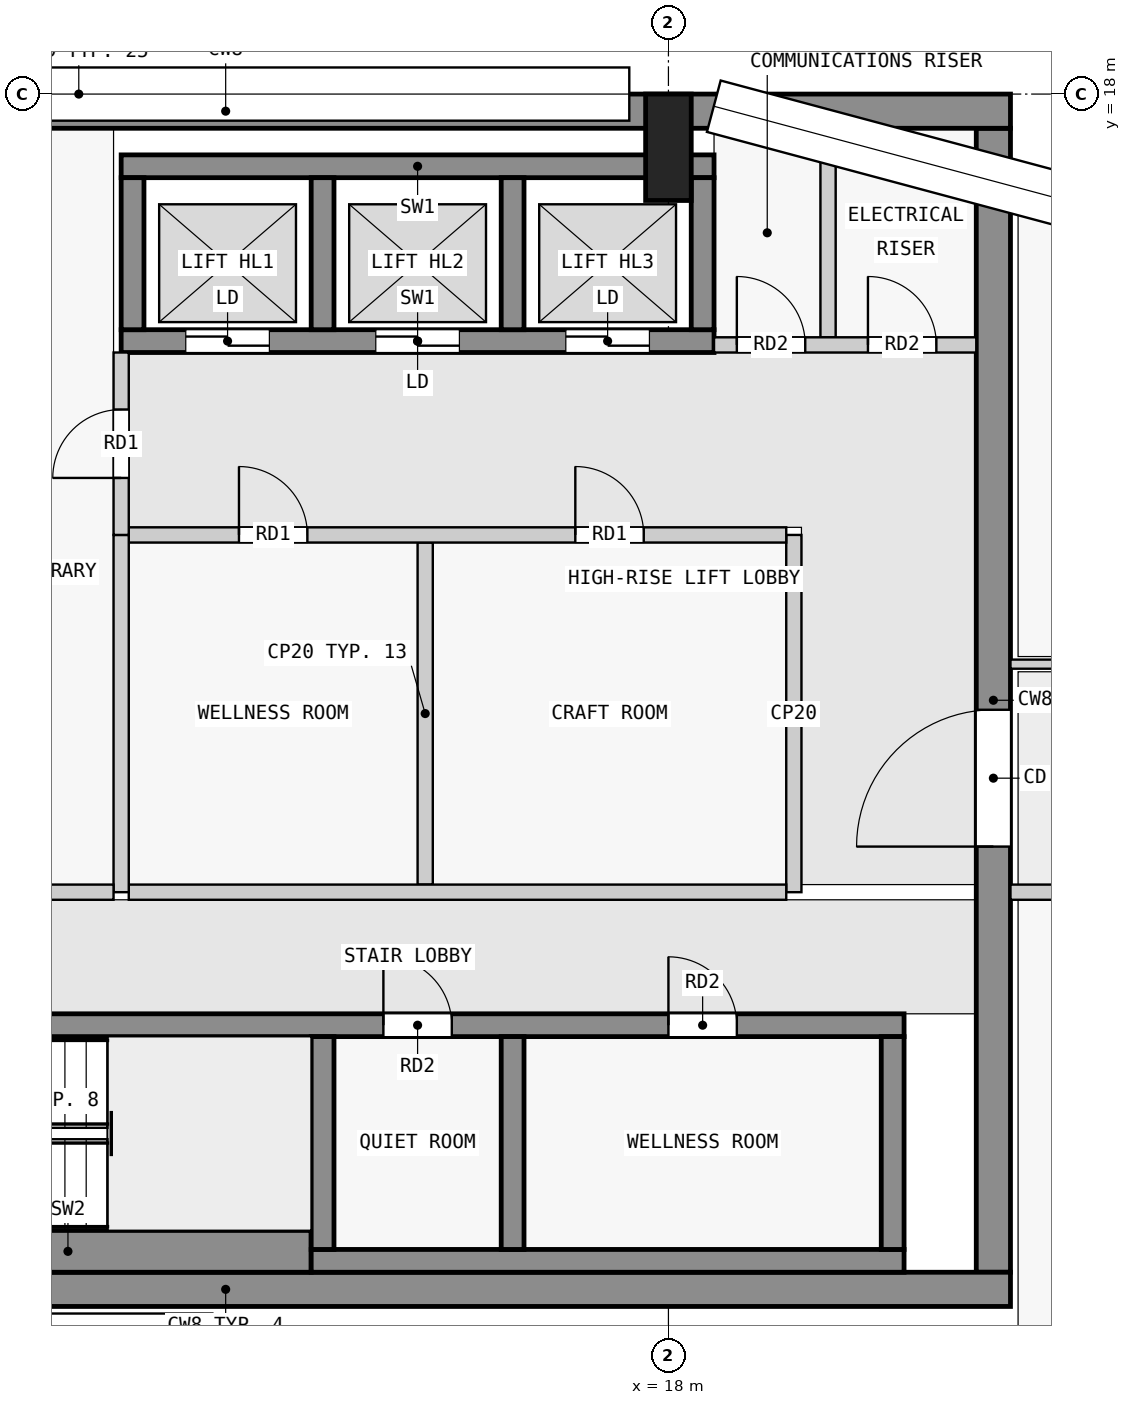
"""IFC4 building model, lengths in metres.
Left out: names, types, materials, properties, quantities, classifications, styles, units other than length and angle.
Written with IfcOpenShell. Run it as: python <this file> out.ifc"""

import sys

from ifc_helpers import new_model, si_unit, direction, frame, frame_2d, origin, origin_2d, place, context, subcontext, project, spatial, rectangle, extrude, element, fill, save


model = new_model("IFC4")
c1 = context("Model", 3, precision=1e-05, world=origin(), true_north=direction((0.0, 1.0)))
c2 = subcontext(c1, "Body", "Model", "MODEL_VIEW")
j1 = project(units=[si_unit("LENGTHUNIT", "METRE"), si_unit("PLANEANGLEUNIT", "RADIAN")], contexts=[c1])
p1 = place(None, origin())
s1 = spatial("IfcSite", under=j1, at=p1, CompositionType="ELEMENT")
p2 = place(p1, origin())
s2 = spatial("IfcBuilding", under=s1, at=p2, CompositionType="ELEMENT")
p3 = place(p2, frame((0.0, 0.0, 291.4)))
s3 = spatial("IfcBuildingStorey", under=s2, at=p3, CompositionType="ELEMENT", Elevation=291.4)
p4 = place(p3, frame((18.0, 17.3, 0.0), z_axis=(0.0, 0.0, 1.0), x_axis=(1.0, 0.0, 0.0)))
e1 = element("IfcColumn", 1, at=p4, inside=s3, PredefinedType="COLUMN", context=c2, shape_type="SweptSolid", body=[
    extrude(rectangle(XDim=0.6, YDim=1.4, at=origin_2d()), origin(), (0.0, 0.0, 1.0), 3.5),
])
for number, where, z_axis, x_axis in (
    (2, (1.85, 2.275, 0.0), (0.0, 0.0, 1.0), (1.0, 0.0, 0.0)),
    (3, (1.85, 17.775, 0.0), (0.0, 0.0, 1.0), (1.0, 0.0, 0.0)),
):
    element("IfcWall", number, at=place(p3, frame(where, z_axis=z_axis, x_axis=x_axis)), inside=s3, PredefinedType="SHEAR", context=c2, shape_type="SweptSolid", body=[
        extrude(rectangle(XDim=20.65, YDim=0.45, at=frame_2d((10.325, 0.0))), origin(), (0.0, 0.0, 1.0), 3.05),
    ])
p5 = place(p3, frame((22.275, 2.5, 0.0), z_axis=(0.0, 0.0, 1.0), x_axis=(0.0, 1.0, 0.0)))
e4 = element("IfcWall", 4, at=p5, inside=s3, PredefinedType="SHEAR", context=c2, shape_type="SweptSolid", body=[
    extrude(rectangle(XDim=15.05, YDim=0.45, at=frame_2d((7.525, 0.0))), origin(), (0.0, 0.0, 1.0), 3.05),
])
p6 = place(p5, frame((5.6, 0.0, 0.0)))
e5 = element("IfcOpeningElement", 5, at=p6, cuts=e4, PredefinedType="OPENING", context=c2, shape_type="SweptSolid", body=[
    extrude(rectangle(XDim=1.8, YDim=2.1, at=frame_2d((0.9, 1.05))), frame((0.0, 0.235, 0.0), z_axis=(0.0, -1.0, 0.0), x_axis=(1.0, 0.0, 0.0)), (0.0, 0.0, 1.0), 0.47),
])
p7 = place(p3, frame((6.9, 2.775, 0.0), z_axis=(0.0, 0.0, 1.0), x_axis=(1.0, 0.0, 0.0)))
e6 = element("IfcWall", 6, at=p7, inside=s3, PredefinedType="SHEAR", context=c2, shape_type="SweptSolid", body=[
    extrude(rectangle(XDim=6.4, YDim=0.55, at=frame_2d((3.2, 0.0))), origin(), (0.0, 0.0, 1.0), 3.05),
])
p8 = place(p3, frame((13.3, 2.65, 0.0), z_axis=(0.0, 0.0, 1.0), x_axis=(1.0, 0.0, 0.0)))
e7 = element("IfcWall", 7, at=p8, inside=s3, PredefinedType="SHEAR", context=c2, shape_type="SweptSolid", body=[
    extrude(rectangle(XDim=7.8, YDim=0.3, at=frame_2d((3.9, 0.0))), origin(), (0.0, 0.0, 1.0), 3.05),
])
for number, where, z_axis, x_axis in (
    (8, (13.45, 2.8, 0.0), (0.0, 0.0, 1.0), (0.0, 1.0, 0.0)),
    (9, (15.95, 2.8, 0.0), (0.0, 0.0, 1.0), (0.0, 1.0, 0.0)),
    (10, (20.95, 2.8, 0.0), (0.0, 0.0, 1.0), (0.0, 1.0, 0.0)),
):
    element("IfcWall", number, at=place(p3, frame(where, z_axis=z_axis, x_axis=x_axis)), inside=s3, PredefinedType="SHEAR", context=c2, shape_type="SweptSolid", body=[
        extrude(rectangle(XDim=2.8, YDim=0.3, at=frame_2d((1.4, 0.0))), origin(), (0.0, 0.0, 1.0), 3.05),
    ])
p9 = place(p3, frame((2.3, 5.75, 0.0), z_axis=(0.0, 0.0, 1.0), x_axis=(1.0, 0.0, 0.0)))
e11 = element("IfcWall", 11, at=p9, inside=s3, PredefinedType="SHEAR", context=c2, shape_type="SweptSolid", body=[
    extrude(rectangle(XDim=18.8, YDim=0.3, at=frame_2d((9.4, 0.0))), origin(), (0.0, 0.0, 1.0), 3.05),
])
p10 = place(p9, frame((4.65, 0.0, 0.0)))
e12 = element("IfcOpeningElement", 12, at=p10, cuts=e11, PredefinedType="OPENING", context=c2, shape_type="SweptSolid", body=[
    extrude(rectangle(XDim=1.1, YDim=2.1, at=frame_2d((0.55, 1.05))), frame((0.0, 0.16, 0.0), z_axis=(0.0, -1.0, 0.0), x_axis=(1.0, 0.0, 0.0)), (0.0, 0.0, 1.0), 0.32),
])
p11 = place(p9, frame((0.45, 0.0, 0.0)))
e13 = element("IfcOpeningElement", 13, at=p11, cuts=e11, PredefinedType="OPENING", context=c2, shape_type="SweptSolid", body=[
    extrude(rectangle(XDim=1.1, YDim=2.1, at=frame_2d((0.55, 1.05))), frame((0.0, 0.16, 0.0), z_axis=(0.0, -1.0, 0.0), x_axis=(1.0, 0.0, 0.0)), (0.0, 0.0, 1.0), 0.32),
])
p12 = place(p9, frame((2.75, 0.0, 0.0)))
e14 = element("IfcOpeningElement", 14, at=p12, cuts=e11, PredefinedType="OPENING", context=c2, shape_type="SweptSolid", body=[
    extrude(rectangle(XDim=1.1, YDim=2.1, at=frame_2d((0.55, 1.05))), frame((0.0, 0.16, 0.0), z_axis=(0.0, -1.0, 0.0), x_axis=(1.0, 0.0, 0.0)), (0.0, 0.0, 1.0), 0.32),
])
p13 = place(p9, frame((11.95, 0.0, 0.0)))
e15 = element("IfcOpeningElement", 15, at=p13, cuts=e11, PredefinedType="OPENING", context=c2, shape_type="SweptSolid", body=[
    extrude(rectangle(XDim=0.9, YDim=2.1, at=frame_2d((0.45, 1.05))), frame((0.0, 0.16, 0.0), z_axis=(0.0, -1.0, 0.0), x_axis=(1.0, 0.0, 0.0)), (0.0, 0.0, 1.0), 0.32),
])
p14 = place(p9, frame((15.7, 0.0, 0.0)))
e16 = element("IfcOpeningElement", 16, at=p14, cuts=e11, PredefinedType="OPENING", context=c2, shape_type="SweptSolid", body=[
    extrude(rectangle(XDim=0.9, YDim=2.1, at=frame_2d((0.45, 1.05))), frame((0.0, 0.16, 0.0), z_axis=(0.0, -1.0, 0.0), x_axis=(1.0, 0.0, 0.0)), (0.0, 0.0, 1.0), 0.32),
])
p15 = place(p3, frame((10.8, 17.05, 0.0), z_axis=(0.0, 0.0, 1.0), x_axis=(1.0, 0.0, 0.0)))
e17 = element("IfcWall", 17, at=p15, inside=s3, PredefinedType="SHEAR", context=c2, shape_type="SweptSolid", body=[
    extrude(rectangle(XDim=7.8, YDim=0.3, at=frame_2d((3.9, 0.0))), origin(), (0.0, 0.0, 1.0), 3.05),
])
p16 = place(p3, frame((10.8, 14.75, 0.0), z_axis=(0.0, 0.0, 1.0), x_axis=(1.0, 0.0, 0.0)))
e18 = element("IfcWall", 18, at=p16, inside=s3, PredefinedType="SHEAR", context=c2, shape_type="SweptSolid", body=[
    extrude(rectangle(XDim=7.8, YDim=0.3, at=frame_2d((3.9, 0.0))), origin(), (0.0, 0.0, 1.0), 3.05),
])
p17 = place(p16, frame((0.85, 0.0, 0.0)))
e19 = element("IfcOpeningElement", 19, at=p17, cuts=e18, PredefinedType="OPENING", context=c2, shape_type="SweptSolid", body=[
    extrude(rectangle(XDim=1.1, YDim=2.1, at=frame_2d((0.55, 1.05))), frame((0.0, 0.16, 0.0), z_axis=(0.0, -1.0, 0.0), x_axis=(1.0, 0.0, 0.0)), (0.0, 0.0, 1.0), 0.32),
])
p18 = place(p16, frame((3.35, 0.0, 0.0)))
e20 = element("IfcOpeningElement", 20, at=p18, cuts=e18, PredefinedType="OPENING", context=c2, shape_type="SweptSolid", body=[
    extrude(rectangle(XDim=1.1, YDim=2.1, at=frame_2d((0.55, 1.05))), frame((0.0, 0.16, 0.0), z_axis=(0.0, -1.0, 0.0), x_axis=(1.0, 0.0, 0.0)), (0.0, 0.0, 1.0), 0.32),
])
p19 = place(p16, frame((5.85, 0.0, 0.0)))
e21 = element("IfcOpeningElement", 21, at=p19, cuts=e18, PredefinedType="OPENING", context=c2, shape_type="SweptSolid", body=[
    extrude(rectangle(XDim=1.1, YDim=2.1, at=frame_2d((0.55, 1.05))), frame((0.0, 0.16, 0.0), z_axis=(0.0, -1.0, 0.0), x_axis=(1.0, 0.0, 0.0)), (0.0, 0.0, 1.0), 0.32),
])
for number, where, z_axis, x_axis in (
    (22, (10.95, 14.9, 0.0), (0.0, 0.0, 1.0), (0.0, 1.0, 0.0)),
    (23, (13.45, 14.9, 0.0), (0.0, 0.0, 1.0), (0.0, 1.0, 0.0)),
    (24, (15.95, 14.9, 0.0), (0.0, 0.0, 1.0), (0.0, 1.0, 0.0)),
    (25, (18.45, 14.9, 0.0), (0.0, 0.0, 1.0), (0.0, 1.0, 0.0)),
):
    element("IfcWall", number, at=place(p3, frame(where, z_axis=z_axis, x_axis=x_axis)), inside=s3, PredefinedType="SHEAR", context=c2, shape_type="SweptSolid", body=[
        extrude(rectangle(XDim=2.0, YDim=0.3, at=frame_2d((1.0, 0.0))), origin(), (0.0, 0.0, 1.0), 3.05),
    ])
p20 = place(p3, frame((7.1, 7.5, 0.0), z_axis=(0.0, 0.0, 1.0), x_axis=(1.0, 0.0, 0.0)))
e26 = element("IfcWall", 26, at=p20, inside=s3, PredefinedType="PARTITIONING", context=c2, shape_type="SweptSolid", body=[
    extrude(rectangle(XDim=3.6, YDim=0.2, at=frame_2d((1.8, 0.0))), origin(), (0.0, 0.0, 1.0), 3.05),
])
p21 = place(p3, frame((10.8, 12.2, 0.0), z_axis=(0.0, 0.0, 1.0), x_axis=(0.0, 1.0, 0.0)))
e27 = element("IfcWall", 27, at=p21, inside=s3, PredefinedType="PARTITIONING", context=c2, shape_type="SweptSolid", body=[
    extrude(rectangle(XDim=2.4, YDim=0.2, at=frame_2d((1.2, 0.0))), origin(), (0.0, 0.0, 1.0), 3.05),
])
p22 = place(p21, frame((0.75, 0.0, 0.0)))
e28 = element("IfcOpeningElement", 28, at=p22, cuts=e27, PredefinedType="OPENING", context=c2, shape_type="SweptSolid", body=[
    extrude(rectangle(XDim=0.9, YDim=2.1, at=frame_2d((0.45, 1.05))), frame((0.0, 0.11, 0.0), z_axis=(0.0, -1.0, 0.0), x_axis=(1.0, 0.0, 0.0)), (0.0, 0.0, 1.0), 0.22),
])
p23 = place(p3, frame((10.8, 7.5, 0.0), z_axis=(0.0, 0.0, 1.0), x_axis=(0.0, 1.0, 0.0)))
e29 = element("IfcWall", 29, at=p23, inside=s3, PredefinedType="PARTITIONING", context=c2, shape_type="SweptSolid", body=[
    extrude(rectangle(XDim=4.7, YDim=0.2, at=frame_2d((2.35, 0.0))), origin(), (0.0, 0.0, 1.0), 3.05),
])
p24 = place(p3, frame((10.9, 7.5, 0.0), z_axis=(0.0, 0.0, 1.0), x_axis=(1.0, 0.0, 0.0)))
e30 = element("IfcWall", 30, at=p24, inside=s3, PredefinedType="PARTITIONING", context=c2, shape_type="SweptSolid", body=[
    extrude(rectangle(XDim=8.65, YDim=0.2, at=frame_2d((4.325, 0.0))), origin(), (0.0, 0.0, 1.0), 3.05),
])
p25 = place(p3, frame((19.65, 7.5, 0.0), z_axis=(0.0, 0.0, 1.0), x_axis=(0.0, 1.0, 0.0)))
e31 = element("IfcWall", 31, at=p25, inside=s3, PredefinedType="PARTITIONING", context=c2, shape_type="SweptSolid", body=[
    extrude(rectangle(XDim=4.7, YDim=0.2, at=frame_2d((2.35, 0.0))), origin(), (0.0, 0.0, 1.0), 3.05),
])
p26 = place(p3, frame((10.9, 12.2, 0.0), z_axis=(0.0, 0.0, 1.0), x_axis=(1.0, 0.0, 0.0)))
e32 = element("IfcWall", 32, at=p26, inside=s3, PredefinedType="PARTITIONING", context=c2, shape_type="SweptSolid", body=[
    extrude(rectangle(XDim=8.65, YDim=0.2, at=frame_2d((4.325, 0.0))), origin(), (0.0, 0.0, 1.0), 3.05),
])
p27 = place(p26, frame((1.45, 0.0, 0.0)))
e33 = element("IfcOpeningElement", 33, at=p27, cuts=e32, PredefinedType="OPENING", context=c2, shape_type="SweptSolid", body=[
    extrude(rectangle(XDim=0.9, YDim=2.1, at=frame_2d((0.45, 1.05))), frame((0.0, 0.11, 0.0), z_axis=(0.0, -1.0, 0.0), x_axis=(1.0, 0.0, 0.0)), (0.0, 0.0, 1.0), 0.22),
])
p28 = place(p26, frame((5.875, 0.0, 0.0)))
e34 = element("IfcOpeningElement", 34, at=p28, cuts=e32, PredefinedType="OPENING", context=c2, shape_type="SweptSolid", body=[
    extrude(rectangle(XDim=0.9, YDim=2.1, at=frame_2d((0.45, 1.05))), frame((0.0, 0.11, 0.0), z_axis=(0.0, -1.0, 0.0), x_axis=(1.0, 0.0, 0.0)), (0.0, 0.0, 1.0), 0.22),
])
p29 = place(p3, frame((14.8, 7.6, 0.0), z_axis=(0.0, 0.0, 1.0), x_axis=(0.0, 1.0, 0.0)))
e35 = element("IfcWall", 35, at=p29, inside=s3, PredefinedType="PARTITIONING", context=c2, shape_type="SweptSolid", body=[
    extrude(rectangle(XDim=4.5, YDim=0.2, at=frame_2d((2.25, 0.0))), origin(), (0.0, 0.0, 1.0), 3.05),
])
p30 = place(p3, frame((18.6, 14.7, 0.0), z_axis=(0.0, 0.0, 1.0), x_axis=(1.0, 0.0, 0.0)))
e36 = element("IfcWall", 36, at=p30, inside=s3, PredefinedType="PARTITIONING", context=c2, shape_type="SweptSolid", body=[
    extrude(rectangle(XDim=3.45, YDim=0.2, at=frame_2d((1.725, 0.0))), origin(), (0.0, 0.0, 1.0), 3.05),
])
p31 = place(p30, frame((0.3, 0.0, 0.0)))
e37 = element("IfcOpeningElement", 37, at=p31, cuts=e36, PredefinedType="OPENING", context=c2, shape_type="SweptSolid", body=[
    extrude(rectangle(XDim=0.9, YDim=2.1, at=frame_2d((0.45, 1.05))), frame((0.0, 0.11, 0.0), z_axis=(0.0, -1.0, 0.0), x_axis=(1.0, 0.0, 0.0)), (0.0, 0.0, 1.0), 0.22),
])
p32 = place(p30, frame((2.025, 0.0, 0.0)))
e38 = element("IfcOpeningElement", 38, at=p32, cuts=e36, PredefinedType="OPENING", context=c2, shape_type="SweptSolid", body=[
    extrude(rectangle(XDim=0.9, YDim=2.1, at=frame_2d((0.45, 1.05))), frame((0.0, 0.11, 0.0), z_axis=(0.0, -1.0, 0.0), x_axis=(1.0, 0.0, 0.0)), (0.0, 0.0, 1.0), 0.22),
])
p33 = place(p3, frame((20.1, 14.8, 0.0), z_axis=(0.0, 0.0, 1.0), x_axis=(0.0, 1.0, 0.0)))
e39 = element("IfcWall", 39, at=p33, inside=s3, PredefinedType="PARTITIONING", context=c2, shape_type="SweptSolid", body=[
    extrude(rectangle(XDim=2.75, YDim=0.2, at=frame_2d((1.375, 0.0))), origin(), (0.0, 0.0, 1.0), 3.05),
])
p34 = place(p3, frame((31.5, 7.5, 0.0), z_axis=(0.0, 0.0, 1.0), x_axis=(-1.0, 0.0, 0.0)))
e40 = element("IfcWall", 40, at=p34, inside=s3, PredefinedType="PARTITIONING", context=c2, shape_type="SweptSolid", body=[
    extrude(rectangle(XDim=9.0, YDim=0.2, at=frame_2d((4.5, 0.0))), origin(), (0.0, 0.0, 1.0), 3.05),
])
p35 = place(p34, frame((3.6, 0.0, 0.0)))
e41 = element("IfcOpeningElement", 41, at=p35, cuts=e40, PredefinedType="OPENING", context=c2, shape_type="SweptSolid", body=[
    extrude(rectangle(XDim=1.8, YDim=2.1, at=frame_2d((0.9, 1.05))), frame((0.0, 0.11, 0.0), z_axis=(0.0, -1.0, 0.0), x_axis=(1.0, 0.0, 0.0)), (0.0, 0.0, 1.0), 0.22),
])
p36 = place(p3, frame((22.5, 10.5, 0.0), z_axis=(0.0, 0.0, 1.0), x_axis=(1.0, 0.0, 0.0)))
e42 = element("IfcWall", 42, at=p36, inside=s3, PredefinedType="PARTITIONING", context=c2, shape_type="SweptSolid", body=[
    extrude(rectangle(XDim=4.5, YDim=0.12, at=frame_2d((2.25, 0.0))), origin(), (0.0, 0.0, 1.0), 3.05),
])
p37 = place(p36, frame((1.85, 0.0, 0.0)))
e43 = element("IfcOpeningElement", 43, at=p37, cuts=e42, PredefinedType="OPENING", context=c2, shape_type="SweptSolid", body=[
    extrude(rectangle(XDim=1.0, YDim=2.1, at=frame_2d((0.5, 1.05))), frame((0.0, 0.07, 0.0), z_axis=(0.0, -1.0, 0.0), x_axis=(1.0, 0.0, 0.0)), (0.0, 0.0, 1.0), 0.14),
])
p38 = place(p22, origin())
e44 = element("IfcDoor", 44, at=p38, inside=s3, OperationType="SINGLE_SWING_LEFT", PredefinedType="DOOR", context=c2, shape_type="SweptSolid", body=[
    extrude(rectangle(XDim=0.9, YDim=2.1, at=frame_2d((0.45, 1.05))), frame((0.0, 0.025, 0.0), z_axis=(0.0, -1.0, 0.0), x_axis=(1.0, 0.0, 0.0)), (0.0, 0.0, 1.0), 0.05),
])
fill(e28, e44)
p39 = place(p27, origin())
e45 = element("IfcDoor", 45, at=p39, inside=s3, OperationType="SINGLE_SWING_LEFT", PredefinedType="DOOR", context=c2, shape_type="SweptSolid", body=[
    extrude(rectangle(XDim=0.9, YDim=2.1, at=frame_2d((0.45, 1.05))), frame((0.0, 0.025, 0.0), z_axis=(0.0, -1.0, 0.0), x_axis=(1.0, 0.0, 0.0)), (0.0, 0.0, 1.0), 0.05),
])
fill(e33, e45)
p40 = place(p28, origin())
e46 = element("IfcDoor", 46, at=p40, inside=s3, OperationType="SINGLE_SWING_LEFT", PredefinedType="DOOR", context=c2, shape_type="SweptSolid", body=[
    extrude(rectangle(XDim=0.9, YDim=2.1, at=frame_2d((0.45, 1.05))), frame((0.0, 0.025, 0.0), z_axis=(0.0, -1.0, 0.0), x_axis=(1.0, 0.0, 0.0)), (0.0, 0.0, 1.0), 0.05),
])
fill(e34, e46)
p41 = place(p17, origin())
e47 = element("IfcDoor", 47, at=p41, inside=s3, OperationType="DOUBLE_DOOR_SLIDING", PredefinedType="DOOR", context=c2, shape_type="SweptSolid", body=[
    extrude(rectangle(XDim=1.1, YDim=2.1, at=frame_2d((0.55, 1.05))), frame((0.0, 0.025, 0.0), z_axis=(0.0, -1.0, 0.0), x_axis=(1.0, 0.0, 0.0)), (0.0, 0.0, 1.0), 0.05),
])
fill(e19, e47)
p42 = place(p18, origin())
e48 = element("IfcDoor", 48, at=p42, inside=s3, OperationType="DOUBLE_DOOR_SLIDING", PredefinedType="DOOR", context=c2, shape_type="SweptSolid", body=[
    extrude(rectangle(XDim=1.1, YDim=2.1, at=frame_2d((0.55, 1.05))), frame((0.0, 0.025, 0.0), z_axis=(0.0, -1.0, 0.0), x_axis=(1.0, 0.0, 0.0)), (0.0, 0.0, 1.0), 0.05),
])
fill(e20, e48)
p43 = place(p19, origin())
e49 = element("IfcDoor", 49, at=p43, inside=s3, OperationType="DOUBLE_DOOR_SLIDING", PredefinedType="DOOR", context=c2, shape_type="SweptSolid", body=[
    extrude(rectangle(XDim=1.1, YDim=2.1, at=frame_2d((0.55, 1.05))), frame((0.0, 0.025, 0.0), z_axis=(0.0, -1.0, 0.0), x_axis=(1.0, 0.0, 0.0)), (0.0, 0.0, 1.0), 0.05),
])
fill(e21, e49)
p44 = place(p6, origin())
e50 = element("IfcDoor", 50, at=p44, inside=s3, OperationType="DOUBLE_DOOR_SINGLE_SWING", PredefinedType="DOOR", context=c2, shape_type="SweptSolid", body=[
    extrude(rectangle(XDim=1.8, YDim=2.1, at=frame_2d((0.9, 1.05))), frame((0.0, 0.025, 0.0), z_axis=(0.0, -1.0, 0.0), x_axis=(1.0, 0.0, 0.0)), (0.0, 0.0, 1.0), 0.05),
])
fill(e5, e50)
p45 = place(p31, origin())
e51 = element("IfcDoor", 51, at=p45, inside=s3, OperationType="SINGLE_SWING_LEFT", PredefinedType="DOOR", context=c2, shape_type="SweptSolid", body=[
    extrude(rectangle(XDim=0.9, YDim=2.1, at=frame_2d((0.45, 1.05))), frame((0.0, 0.025, 0.0), z_axis=(0.0, -1.0, 0.0), x_axis=(1.0, 0.0, 0.0)), (0.0, 0.0, 1.0), 0.05),
])
fill(e37, e51)
p46 = place(p32, origin())
e52 = element("IfcDoor", 52, at=p46, inside=s3, OperationType="SINGLE_SWING_LEFT", PredefinedType="DOOR", context=c2, shape_type="SweptSolid", body=[
    extrude(rectangle(XDim=0.9, YDim=2.1, at=frame_2d((0.45, 1.05))), frame((0.0, 0.025, 0.0), z_axis=(0.0, -1.0, 0.0), x_axis=(1.0, 0.0, 0.0)), (0.0, 0.0, 1.0), 0.05),
])
fill(e38, e52)
p47 = place(p13, origin())
e53 = element("IfcDoor", 53, at=p47, inside=s3, OperationType="SINGLE_SWING_LEFT", PredefinedType="DOOR", context=c2, shape_type="SweptSolid", body=[
    extrude(rectangle(XDim=0.9, YDim=2.1, at=frame_2d((0.45, 1.05))), frame((0.0, 0.025, 0.0), z_axis=(0.0, -1.0, 0.0), x_axis=(1.0, 0.0, 0.0)), (0.0, 0.0, 1.0), 0.05),
])
fill(e15, e53)
p48 = place(p14, origin())
e54 = element("IfcDoor", 54, at=p48, inside=s3, OperationType="SINGLE_SWING_LEFT", PredefinedType="DOOR", context=c2, shape_type="SweptSolid", body=[
    extrude(rectangle(XDim=0.9, YDim=2.1, at=frame_2d((0.45, 1.05))), frame((0.0, 0.025, 0.0), z_axis=(0.0, -1.0, 0.0), x_axis=(1.0, 0.0, 0.0)), (0.0, 0.0, 1.0), 0.05),
])
fill(e16, e54)
save(model, sys.argv[1])
